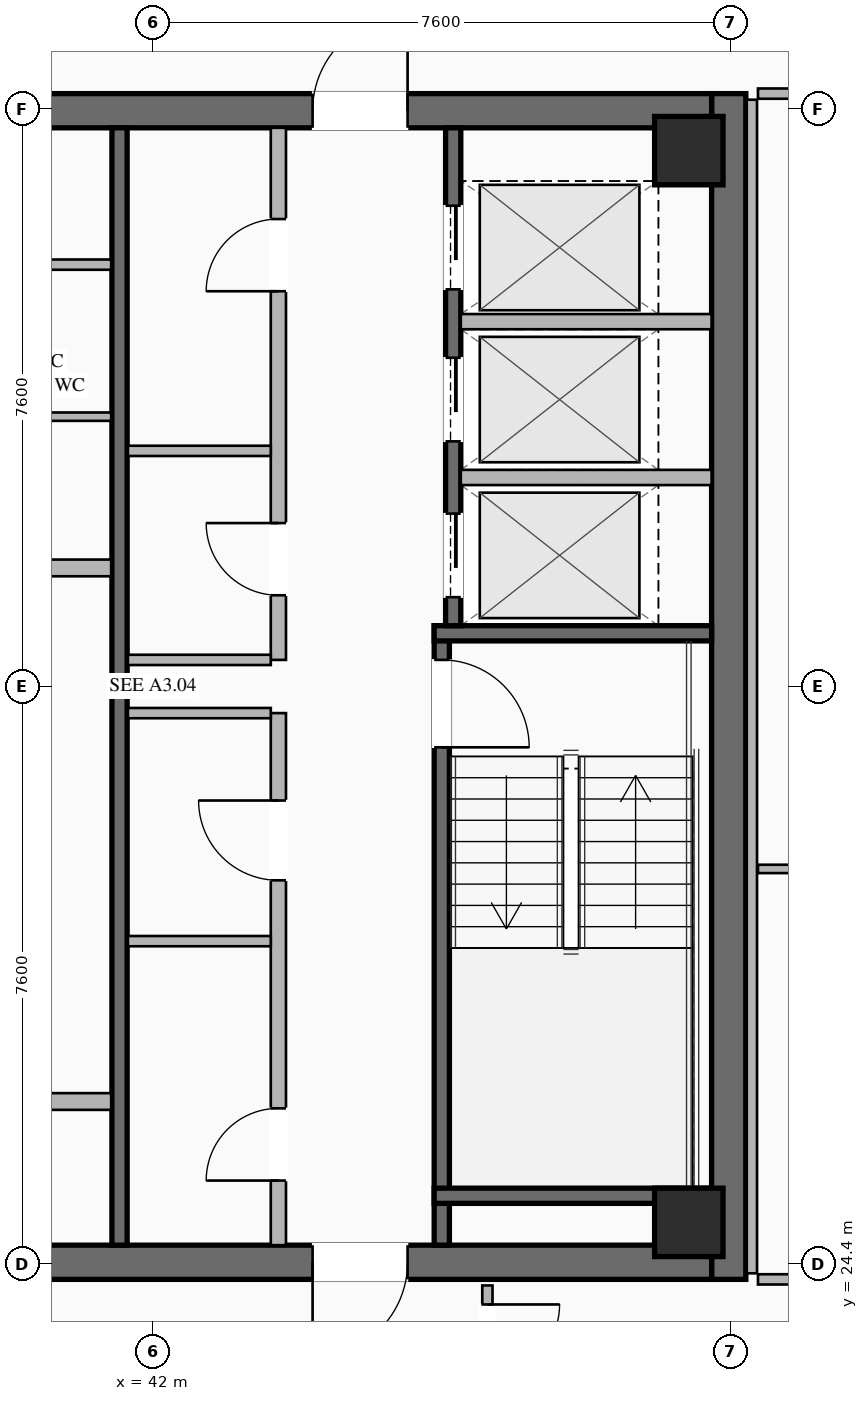
"""IFC4 building model, lengths in metres.
Left out: names, types, materials, properties, quantities, classifications, styles, units other than length and angle.
Written with IfcOpenShell. Run it as: python <this file> out.ifc"""

import sys

from ifc_helpers import new_model, si_unit, direction, frame, frame_2d, origin, origin_2d, place, context, subcontext, project, spatial, rectangle, hollow_rectangle, extrude, element, fill, save


model = new_model("IFC4")
c1 = context("Model", 3, precision=1e-05, world=origin(), true_north=direction((0.0, 1.0)))
c2 = subcontext(c1, "Body", "Model", "MODEL_VIEW")
j1 = project(units=[si_unit("LENGTHUNIT", "METRE"), si_unit("PLANEANGLEUNIT", "RADIAN")], contexts=[c1])
p1 = place(None, origin())
s1 = spatial("IfcSite", under=j1, at=p1, CompositionType="ELEMENT")
p2 = place(p1, origin())
s2 = spatial("IfcBuilding", under=s1, at=p2, CompositionType="ELEMENT")
p3 = place(p2, frame((0.0, 0.0, 274.05)))
s3 = spatial("IfcBuildingStorey", under=s2, at=p3, CompositionType="ELEMENT", Elevation=274.05)
p4 = place(p3, frame((49.575, 39.8, 0.0), z_axis=(0.0, 0.0, 1.0), x_axis=(0.0, -1.0, 0.0)))
e1 = element("IfcWall", 1, at=p4, inside=s3, PredefinedType="SHEAR", context=c2, shape_type="SweptSolid", body=[
    extrude(rectangle(XDim=15.6, YDim=0.45, at=frame_2d((7.8, 0.0))), origin(), (0.0, 0.0, 1.0), 3.55),
])
p5 = place(p3, frame((49.35, 24.425, 0.0), z_axis=(0.0, 0.0, 1.0), x_axis=(-1.0, 0.0, 0.0)))
e2 = element("IfcWall", 2, at=p5, inside=s3, PredefinedType="SHEAR", context=c2, shape_type="SweptSolid", body=[
    extrude(rectangle(XDim=14.7, YDim=0.45, at=frame_2d((7.35, 0.0))), origin(), (0.0, 0.0, 1.0), 3.55),
])
p6 = place(p5, frame((9.05, 0.0, 0.0)))
e3 = element("IfcOpeningElement", 3, at=p6, cuts=e2, PredefinedType="OPENING", context=c2, shape_type="SweptSolid", body=[
    extrude(rectangle(XDim=1.25, YDim=2.25, at=frame_2d((0.625, 1.125))), frame((0.0, 0.235, 0.0), z_axis=(0.0, -1.0, 0.0), x_axis=(1.0, 0.0, 0.0)), (0.0, 0.0, 1.0), 0.47),
])
p7 = place(p5, frame((4.0, 0.0, 0.0)))
e4 = element("IfcOpeningElement", 4, at=p7, cuts=e2, PredefinedType="OPENING", context=c2, shape_type="SweptSolid", body=[
    extrude(rectangle(XDim=1.25, YDim=2.25, at=frame_2d((0.625, 1.125))), frame((0.0, 0.235, 0.0), z_axis=(0.0, -1.0, 0.0), x_axis=(1.0, 0.0, 0.0)), (0.0, 0.0, 1.0), 0.47),
])
p8 = place(p3, frame((34.65, 39.575, 0.0), z_axis=(0.0, 0.0, 1.0), x_axis=(1.0, 0.0, 0.0)))
e5 = element("IfcWall", 5, at=p8, inside=s3, PredefinedType="SHEAR", context=c2, shape_type="SweptSolid", body=[
    extrude(rectangle(XDim=14.7, YDim=0.45, at=frame_2d((7.35, 0.0))), origin(), (0.0, 0.0, 1.0), 3.55),
])
p9 = place(p8, frame((4.4, 0.0, 0.0)))
e6 = element("IfcOpeningElement", 6, at=p9, cuts=e5, PredefinedType="OPENING", context=c2, shape_type="SweptSolid", body=[
    extrude(rectangle(XDim=1.25, YDim=2.25, at=frame_2d((0.625, 1.125))), frame((0.0, 0.235, 0.0), z_axis=(0.0, -1.0, 0.0), x_axis=(1.0, 0.0, 0.0)), (0.0, 0.0, 1.0), 0.47),
])
p10 = place(p8, frame((9.45, 0.0, 0.0)))
e7 = element("IfcOpeningElement", 7, at=p10, cuts=e5, PredefinedType="OPENING", context=c2, shape_type="SweptSolid", body=[
    extrude(rectangle(XDim=1.25, YDim=2.25, at=frame_2d((0.625, 1.125))), frame((0.0, 0.235, 0.0), z_axis=(0.0, -1.0, 0.0), x_axis=(1.0, 0.0, 0.0)), (0.0, 0.0, 1.0), 0.47),
])
for number, where, z_axis, x_axis in (
    (8, (49.05, 24.95, 0.0), (0.0, 0.0, 1.0), (1.0, 0.0, 0.0)),
    (9, (49.05, 39.05, 0.0), (0.0, 0.0, 1.0), (1.0, 0.0, 0.0)),
):
    element("IfcColumn", number, at=place(p3, frame(where, z_axis=z_axis, x_axis=x_axis)), inside=s3, PredefinedType="COLUMN", context=c2, shape_type="SweptSolid", body=[
        extrude(hollow_rectangle(XDim=0.9, YDim=0.9, WallThickness=0.04, at=origin_2d()), origin(), (0.0, 0.0, 1.0), 3.25),
    ])
p11 = place(p3, frame((45.8, 32.8, 0.0), z_axis=(0.0, 0.0, 1.0), x_axis=(0.0, -1.0, 0.0)))
e10 = element("IfcWall", 10, at=p11, inside=s3, PredefinedType="SHEAR", context=c2, shape_type="SweptSolid", body=[
    extrude(rectangle(XDim=8.15, YDim=0.2, at=frame_2d((4.075, 0.0))), origin(), (0.0, 0.0, 1.0), 3.25),
])
p12 = place(p11, frame((0.45, 0.0, 0.0)))
e11 = element("IfcOpeningElement", 11, at=p12, cuts=e10, PredefinedType="OPENING", context=c2, shape_type="SweptSolid", body=[
    extrude(rectangle(XDim=1.15, YDim=2.2, at=frame_2d((0.575, 1.1))), frame((0.0, 0.11, 0.0), z_axis=(0.0, -1.0, 0.0), x_axis=(1.0, 0.0, 0.0)), (0.0, 0.0, 1.0), 0.22),
])
for number, where, z_axis, x_axis in (
    (12, (45.7, 32.7, 0.0), (0.0, 0.0, 1.0), (1.0, 0.0, 0.0)),
    (13, (45.7, 25.3, 0.0), (0.0, 0.0, 1.0), (1.0, 0.0, 0.0)),
):
    element("IfcWall", number, at=place(p3, frame(where, z_axis=z_axis, x_axis=x_axis)), inside=s3, PredefinedType="SHEAR", context=c2, shape_type="SweptSolid", body=[
        extrude(rectangle(XDim=3.65, YDim=0.2, at=frame_2d((1.825, 0.0))), origin(), (0.0, 0.0, 1.0), 3.25),
    ])
p13 = place(p3, frame((41.56, 24.65, 0.0), z_axis=(0.0, 0.0, 1.0), x_axis=(0.0, 1.0, 0.0)))
e14 = element("IfcWall", 14, at=p13, inside=s3, PredefinedType="SHEAR", context=c2, shape_type="SweptSolid", body=[
    extrude(rectangle(XDim=14.7, YDim=0.2, at=frame_2d((7.35, 0.0))), origin(), (0.0, 0.0, 1.0), 3.25),
])
p14 = place(p3, frame((38.3, 33.56, 0.0), z_axis=(0.0, 0.0, 1.0), x_axis=(1.0, 0.0, 0.0)))
e15 = element("IfcWall", 15, at=p14, inside=s3, PredefinedType="SOLIDWALL", context=c2, shape_type="SweptSolid", body=[
    extrude(rectangle(XDim=3.15, YDim=0.22, at=frame_2d((1.575, 0.0))), origin(), (0.0, 0.0, 1.0), 2.603),
])
p15 = place(p14, frame((1.1, 0.0, 0.0)))
e16 = element("IfcOpeningElement", 16, at=p15, cuts=e15, PredefinedType="OPENING", context=c2, shape_type="SweptSolid", body=[
    extrude(rectangle(XDim=0.95, YDim=2.05, at=frame_2d((0.475, 1.025))), frame((0.0, 0.12, 0.0), z_axis=(0.0, -1.0, 0.0), x_axis=(1.0, 0.0, 0.0)), (0.0, 0.0, 1.0), 0.24),
])
p16 = place(p3, frame((38.3, 26.54, 0.0), z_axis=(0.0, 0.0, 1.0), x_axis=(1.0, 0.0, 0.0)))
e17 = element("IfcWall", 17, at=p16, inside=s3, PredefinedType="SOLIDWALL", context=c2, shape_type="SweptSolid", body=[
    extrude(rectangle(XDim=3.15, YDim=0.22, at=frame_2d((1.575, 0.0))), origin(), (0.0, 0.0, 1.0), 2.603),
])
p17 = place(p16, frame((0.95, 0.0, 0.0)))
e18 = element("IfcOpeningElement", 18, at=p17, cuts=e17, PredefinedType="OPENING", context=c2, shape_type="SweptSolid", body=[
    extrude(rectangle(XDim=1.25, YDim=2.25, at=frame_2d((0.625, 1.125))), frame((0.0, 0.12, 0.0), z_axis=(0.0, -1.0, 0.0), x_axis=(1.0, 0.0, 0.0)), (0.0, 0.0, 1.0), 0.24),
])
p18 = place(p3, frame((45.95, 39.35, 0.0), z_axis=(0.0, 0.0, 1.0), x_axis=(0.0, -1.0, 0.0)))
e19 = element("IfcWall", 19, at=p18, inside=s3, PredefinedType="SHEAR", context=c2, shape_type="SweptSolid", body=[
    extrude(rectangle(XDim=6.55, YDim=0.2, at=frame_2d((3.275, 0.0))), origin(), (0.0, 0.0, 1.0), 3.25),
])
p19 = place(p18, frame((5.075, 0.0, 0.0)))
e20 = element("IfcOpeningElement", 20, at=p19, cuts=e19, PredefinedType="OPENING", context=c2, shape_type="SweptSolid", body=[
    extrude(rectangle(XDim=1.1, YDim=2.2, at=frame_2d((0.55, 1.1))), frame((0.0, 0.11, 0.0), z_axis=(0.0, -1.0, 0.0), x_axis=(1.0, 0.0, 0.0)), (0.0, 0.0, 1.0), 0.22),
])
p20 = place(p18, frame((3.025, 0.0, 0.0)))
e21 = element("IfcOpeningElement", 21, at=p20, cuts=e19, PredefinedType="OPENING", context=c2, shape_type="SweptSolid", body=[
    extrude(rectangle(XDim=1.1, YDim=2.2, at=frame_2d((0.55, 1.1))), frame((0.0, 0.11, 0.0), z_axis=(0.0, -1.0, 0.0), x_axis=(1.0, 0.0, 0.0)), (0.0, 0.0, 1.0), 0.22),
])
p21 = place(p18, frame((1.025, 0.0, 0.0)))
e22 = element("IfcOpeningElement", 22, at=p21, cuts=e19, PredefinedType="OPENING", context=c2, shape_type="SweptSolid", body=[
    extrude(rectangle(XDim=1.1, YDim=2.2, at=frame_2d((0.55, 1.1))), frame((0.0, 0.11, 0.0), z_axis=(0.0, -1.0, 0.0), x_axis=(1.0, 0.0, 0.0)), (0.0, 0.0, 1.0), 0.22),
])
for number, where, z_axis, x_axis in (
    (23, (46.05, 34.75, 0.0), (0.0, 0.0, 1.0), (1.0, 0.0, 0.0)),
    (24, (46.05, 36.8, 0.0), (0.0, 0.0, 1.0), (1.0, 0.0, 0.0)),
):
    element("IfcWall", number, at=place(p3, frame(where, z_axis=z_axis, x_axis=x_axis)), inside=s3, PredefinedType="SOLIDWALL", context=c2, shape_type="SweptSolid", body=[
        extrude(rectangle(XDim=3.3, YDim=0.2, at=frame_2d((1.65, 0.0))), origin(), (0.0, 0.0, 1.0), 3.25),
    ])
p22 = place(p3, frame((38.3, 37.55, 0.0), z_axis=(0.0, 0.0, 1.0), x_axis=(1.0, 0.0, 0.0)))
e25 = element("IfcWall", 25, at=p22, inside=s3, PredefinedType="PARTITIONING", context=c2, shape_type="SweptSolid", body=[
    extrude(rectangle(XDim=3.15, YDim=0.135, at=frame_2d((1.575, 0.0))), origin(), (0.0, 0.0, 1.0), 2.603),
])
p23 = place(p22, frame((1.05, 0.0, 0.0)))
e26 = element("IfcOpeningElement", 26, at=p23, cuts=e25, PredefinedType="OPENING", context=c2, shape_type="SweptSolid", body=[
    extrude(rectangle(XDim=1.05, YDim=2.2, at=frame_2d((0.525, 1.1))), frame((0.0, 0.077, 0.0), z_axis=(0.0, -1.0, 0.0), x_axis=(1.0, 0.0, 0.0)), (0.0, 0.0, 1.0), 0.155),
])
p24 = place(p3, frame((38.3, 35.55, 0.0), z_axis=(0.0, 0.0, 1.0), x_axis=(1.0, 0.0, 0.0)))
e27 = element("IfcWall", 27, at=p24, inside=s3, PredefinedType="PARTITIONING", context=c2, shape_type="SweptSolid", body=[
    extrude(rectangle(XDim=3.15, YDim=0.11, at=frame_2d((1.575, 0.0))), origin(), (0.0, 0.0, 1.0), 2.603),
])
p25 = place(p3, frame((43.65, 24.65, 0.0), z_axis=(0.0, 0.0, 1.0), x_axis=(0.0, 1.0, 0.0)))
e28 = element("IfcWall", 28, at=p25, inside=s3, PredefinedType="SOLIDWALL", context=c2, shape_type="SweptSolid", body=[
    extrude(rectangle(XDim=7.0, YDim=0.2, at=frame_2d((3.5, 0.0))), origin(), (0.0, 0.0, 1.0), 2.603),
])
p26 = place(p25, frame((0.85, 0.0, 0.0)))
e29 = element("IfcOpeningElement", 29, at=p26, cuts=e28, PredefinedType="OPENING", context=c2, shape_type="SweptSolid", body=[
    extrude(rectangle(XDim=0.95, YDim=2.05, at=frame_2d((0.475, 1.025))), frame((0.0, 0.11, 0.0), z_axis=(0.0, -1.0, 0.0), x_axis=(1.0, 0.0, 0.0)), (0.0, 0.0, 1.0), 0.22),
])
p27 = place(p25, frame((4.8, 0.0, 0.0)))
e30 = element("IfcOpeningElement", 30, at=p27, cuts=e28, PredefinedType="OPENING", context=c2, shape_type="SweptSolid", body=[
    extrude(rectangle(XDim=1.05, YDim=2.2, at=frame_2d((0.525, 1.1))), frame((0.0, 0.11, 0.0), z_axis=(0.0, -1.0, 0.0), x_axis=(1.0, 0.0, 0.0)), (0.0, 0.0, 1.0), 0.22),
])
for number, where, z_axis, x_axis in (
    (31, (41.67, 31.65, 0.0), (0.0, 0.0, 1.0), (1.0, 0.0, 0.0)),
    (32, (41.67, 28.65, 0.0), (0.0, 0.0, 1.0), (1.0, 0.0, 0.0)),
):
    element("IfcWall", number, at=place(p3, frame(where, z_axis=z_axis, x_axis=x_axis)), inside=s3, PredefinedType="PARTITIONING", context=c2, shape_type="SweptSolid", body=[
        extrude(rectangle(XDim=1.88, YDim=0.135, at=frame_2d((0.94, 0.0))), origin(), (0.0, 0.0, 1.0), 2.603),
    ])
p28 = place(p3, frame((43.65, 32.35, 0.0), z_axis=(0.0, 0.0, 1.0), x_axis=(0.0, 1.0, 0.0)))
e33 = element("IfcWall", 33, at=p28, inside=s3, PredefinedType="SOLIDWALL", context=c2, shape_type="SweptSolid", body=[
    extrude(rectangle(XDim=7.0, YDim=0.2, at=frame_2d((3.5, 0.0))), origin(), (0.0, 0.0, 1.0), 2.603),
])
p29 = place(p28, frame((0.85, 0.0, 0.0)))
e34 = element("IfcOpeningElement", 34, at=p29, cuts=e33, PredefinedType="OPENING", context=c2, shape_type="SweptSolid", body=[
    extrude(rectangle(XDim=0.95, YDim=2.05, at=frame_2d((0.475, 1.025))), frame((0.0, 0.11, 0.0), z_axis=(0.0, -1.0, 0.0), x_axis=(1.0, 0.0, 0.0)), (0.0, 0.0, 1.0), 0.22),
])
p30 = place(p28, frame((4.85, 0.0, 0.0)))
e35 = element("IfcOpeningElement", 35, at=p30, cuts=e33, PredefinedType="OPENING", context=c2, shape_type="SweptSolid", body=[
    extrude(rectangle(XDim=0.95, YDim=2.05, at=frame_2d((0.475, 1.025))), frame((0.0, 0.11, 0.0), z_axis=(0.0, -1.0, 0.0), x_axis=(1.0, 0.0, 0.0)), (0.0, 0.0, 1.0), 0.22),
])
for number, where, z_axis, x_axis in (
    (36, (41.67, 32.35, 0.0), (0.0, 0.0, 1.0), (1.0, 0.0, 0.0)),
    (37, (41.67, 35.1, 0.0), (0.0, 0.0, 1.0), (1.0, 0.0, 0.0)),
):
    element("IfcWall", number, at=place(p3, frame(where, z_axis=z_axis, x_axis=x_axis)), inside=s3, PredefinedType="PARTITIONING", context=c2, shape_type="SweptSolid", body=[
        extrude(rectangle(XDim=1.88, YDim=0.135, at=frame_2d((0.94, 0.0))), origin(), (0.0, 0.0, 1.0), 2.603),
    ])
p31 = place(p3, frame((46.4, 24.12, 0.0), z_axis=(0.0, 0.0, 1.0), x_axis=(0.0, -1.0, 0.0)))
e38 = element("IfcWall", 38, at=p31, inside=s3, PredefinedType="PARTITIONING", context=c2, shape_type="SweptSolid", body=[
    extrude(rectangle(XDim=1.49, YDim=0.135, at=frame_2d((0.745, 0.0))), origin(), (0.0, 0.0, 1.0), 2.603),
])
p32 = place(p31, frame((0.25, 0.0, 0.0)))
e39 = element("IfcOpeningElement", 39, at=p32, cuts=e38, PredefinedType="OPENING", context=c2, shape_type="SweptSolid", body=[
    extrude(rectangle(XDim=0.95, YDim=2.05, at=frame_2d((0.475, 1.025))), frame((0.0, 0.077, 0.0), z_axis=(0.0, -1.0, 0.0), x_axis=(1.0, 0.0, 0.0)), (0.0, 0.0, 1.0), 0.155),
])
p33 = place(p3, frame((49.88, 39.72, 0.0), z_axis=(0.0, 0.0, 1.0), x_axis=(0.0, -1.0, 0.0)))
e40 = element("IfcWall", 40, at=p33, inside=s3, PredefinedType="PARTITIONING", context=c2, shape_type="SweptSolid", body=[
    extrude(rectangle(XDim=15.44, YDim=0.135, at=frame_2d((7.72, 0.0))), origin(), (0.0, 0.0, 1.0), 2.603),
])
p34 = place(p3, frame((57.18, 39.8, 0.0), z_axis=(0.0, 0.0, 1.0), x_axis=(-1.0, 0.0, 0.0)))
e41 = element("IfcWall", 41, at=p34, inside=s3, PredefinedType="PARTITIONING", context=c2, shape_type="SweptSolid", body=[
    extrude(rectangle(XDim=7.22, YDim=0.135, at=frame_2d((3.61, 0.0))), origin(), (0.0, 0.0, 1.0), 2.603),
])
p35 = place(p34, frame((5.78, 0.0, 0.0)))
e42 = element("IfcOpeningElement", 42, at=p35, cuts=e41, PredefinedType="OPENING", context=c2, shape_type="SweptSolid", body=[
    extrude(rectangle(XDim=0.95, YDim=2.05, at=frame_2d((0.475, 1.025))), frame((0.0, 0.077, 0.0), z_axis=(0.0, -1.0, 0.0), x_axis=(1.0, 0.0, 0.0)), (0.0, 0.0, 1.0), 0.155),
])
p36 = place(p3, frame((49.96, 24.2, 0.0), z_axis=(0.0, 0.0, 1.0), x_axis=(1.0, 0.0, 0.0)))
e43 = element("IfcWall", 43, at=p36, inside=s3, PredefinedType="PARTITIONING", context=c2, shape_type="SweptSolid", body=[
    extrude(rectangle(XDim=7.22, YDim=0.135, at=frame_2d((3.61, 0.0))), origin(), (0.0, 0.0, 1.0), 2.603),
])
p37 = place(p3, frame((49.96, 29.6, 0.0), z_axis=(0.0, 0.0, 1.0), x_axis=(1.0, 0.0, 0.0)))
e44 = element("IfcWall", 44, at=p37, inside=s3, PredefinedType="PARTITIONING", context=c2, shape_type="SweptSolid", body=[
    extrude(rectangle(XDim=7.22, YDim=0.11, at=frame_2d((3.61, 0.0))), origin(), (0.0, 0.0, 1.0), 2.603),
])
p38 = place(p37, frame((1.8, 0.0, 0.0)))
e45 = element("IfcOpeningElement", 45, at=p38, cuts=e44, PredefinedType="OPENING", context=c2, shape_type="SweptSolid", body=[
    extrude(rectangle(XDim=0.95, YDim=2.05, at=frame_2d((0.475, 1.025))), frame((0.0, 0.065, 0.0), z_axis=(0.0, -1.0, 0.0), x_axis=(1.0, 0.0, 0.0)), (0.0, 0.0, 1.0), 0.13),
])
p39 = place(p10, origin())
e46 = element("IfcDoor", 46, at=p39, inside=s3, OperationType="SINGLE_SWING_RIGHT", PredefinedType="DOOR", context=c2, shape_type="SweptSolid", body=[
    extrude(rectangle(XDim=1.25, YDim=2.25, at=frame_2d((0.625, 1.125))), frame((0.0, 0.025, 0.0), z_axis=(0.0, -1.0, 0.0), x_axis=(1.0, 0.0, 0.0)), (0.0, 0.0, 1.0), 0.05),
])
fill(e7, e46)
p40 = place(p7, origin())
e47 = element("IfcDoor", 47, at=p40, inside=s3, OperationType="SINGLE_SWING_RIGHT", PredefinedType="DOOR", context=c2, shape_type="SweptSolid", body=[
    extrude(rectangle(XDim=1.25, YDim=2.25, at=frame_2d((0.625, 1.125))), frame((0.0, 0.025, 0.0), z_axis=(0.0, -1.0, 0.0), x_axis=(1.0, 0.0, 0.0)), (0.0, 0.0, 1.0), 0.05),
])
fill(e4, e47)
p41 = place(p12, origin())
e48 = element("IfcDoor", 48, at=p41, inside=s3, OperationType="SINGLE_SWING_RIGHT", PredefinedType="DOOR", context=c2, shape_type="SweptSolid", body=[
    extrude(rectangle(XDim=1.15, YDim=2.2, at=frame_2d((0.575, 1.1))), frame((0.0, 0.025, 0.0), z_axis=(0.0, -1.0, 0.0), x_axis=(1.0, 0.0, 0.0)), (0.0, 0.0, 1.0), 0.05),
])
fill(e11, e48)
p42 = place(p26, origin())
e49 = element("IfcDoor", 49, at=p42, inside=s3, OperationType="SINGLE_SWING_LEFT", PredefinedType="DOOR", context=c2, shape_type="SweptSolid", body=[
    extrude(rectangle(XDim=0.95, YDim=2.05, at=frame_2d((0.475, 1.025))), frame((0.0, 0.025, 0.0), z_axis=(0.0, -1.0, 0.0), x_axis=(1.0, 0.0, 0.0)), (0.0, 0.0, 1.0), 0.05),
])
fill(e29, e49)
p43 = place(p27, origin())
e50 = element("IfcDoor", 50, at=p43, inside=s3, OperationType="SINGLE_SWING_RIGHT", PredefinedType="DOOR", context=c2, shape_type="SweptSolid", body=[
    extrude(rectangle(XDim=1.05, YDim=2.2, at=frame_2d((0.525, 1.1))), frame((0.0, 0.025, 0.0), z_axis=(0.0, -1.0, 0.0), x_axis=(1.0, 0.0, 0.0)), (0.0, 0.0, 1.0), 0.05),
])
fill(e30, e50)
p44 = place(p29, origin())
e51 = element("IfcDoor", 51, at=p44, inside=s3, OperationType="SINGLE_SWING_RIGHT", PredefinedType="DOOR", context=c2, shape_type="SweptSolid", body=[
    extrude(rectangle(XDim=0.95, YDim=2.05, at=frame_2d((0.475, 1.025))), frame((0.0, 0.025, 0.0), z_axis=(0.0, -1.0, 0.0), x_axis=(1.0, 0.0, 0.0)), (0.0, 0.0, 1.0), 0.05),
])
fill(e34, e51)
p45 = place(p30, origin())
e52 = element("IfcDoor", 52, at=p45, inside=s3, OperationType="SINGLE_SWING_LEFT", PredefinedType="DOOR", context=c2, shape_type="SweptSolid", body=[
    extrude(rectangle(XDim=0.95, YDim=2.05, at=frame_2d((0.475, 1.025))), frame((0.0, 0.025, 0.0), z_axis=(0.0, -1.0, 0.0), x_axis=(1.0, 0.0, 0.0)), (0.0, 0.0, 1.0), 0.05),
])
fill(e35, e52)
p46 = place(p32, origin())
e53 = element("IfcDoor", 53, at=p46, inside=s3, OperationType="SINGLE_SWING_LEFT", PredefinedType="DOOR", context=c2, shape_type="SweptSolid", body=[
    extrude(rectangle(XDim=0.95, YDim=2.05, at=frame_2d((0.475, 1.025))), frame((0.0, 0.025, 0.0), z_axis=(0.0, -1.0, 0.0), x_axis=(1.0, 0.0, 0.0)), (0.0, 0.0, 1.0), 0.05),
])
fill(e39, e53)
p47 = place(p19, origin())
e54 = element("IfcDoor", 54, at=p47, inside=s3, OperationType="SLIDING_TO_LEFT", PredefinedType="DOOR", context=c2, shape_type="SweptSolid", body=[
    extrude(rectangle(XDim=1.1, YDim=2.2, at=frame_2d((0.55, 1.1))), frame((0.0, 0.025, 0.0), z_axis=(0.0, -1.0, 0.0), x_axis=(1.0, 0.0, 0.0)), (0.0, 0.0, 1.0), 0.05),
])
fill(e20, e54)
p48 = place(p20, origin())
e55 = element("IfcDoor", 55, at=p48, inside=s3, OperationType="SLIDING_TO_LEFT", PredefinedType="DOOR", context=c2, shape_type="SweptSolid", body=[
    extrude(rectangle(XDim=1.1, YDim=2.2, at=frame_2d((0.55, 1.1))), frame((0.0, 0.025, 0.0), z_axis=(0.0, -1.0, 0.0), x_axis=(1.0, 0.0, 0.0)), (0.0, 0.0, 1.0), 0.05),
])
fill(e21, e55)
p49 = place(p21, origin())
e56 = element("IfcDoor", 56, at=p49, inside=s3, OperationType="SLIDING_TO_LEFT", PredefinedType="DOOR", context=c2, shape_type="SweptSolid", body=[
    extrude(rectangle(XDim=1.1, YDim=2.2, at=frame_2d((0.55, 1.1))), frame((0.0, 0.025, 0.0), z_axis=(0.0, -1.0, 0.0), x_axis=(1.0, 0.0, 0.0)), (0.0, 0.0, 1.0), 0.05),
])
fill(e22, e56)
save(model, sys.argv[1])
